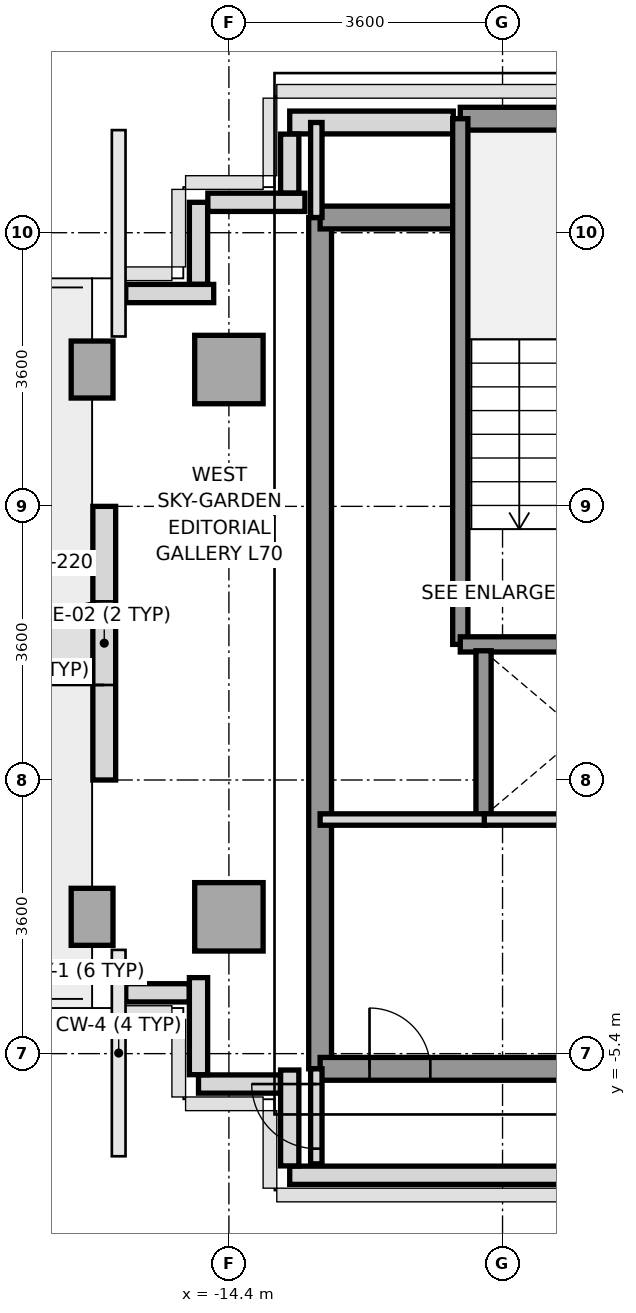
"""IFC4 building model, lengths in metres.
Left out: names, types, materials, properties, quantities, classifications, styles, units other than length and angle.
Written with IfcOpenShell. Run it as: python <this file> out.ifc"""

import sys

from ifc_helpers import new_model, si_unit, direction, frame, frame_2d, origin, origin_2d, place, context, subcontext, project, spatial, rectangle, extrude, source, transform, mapped, element, fill, save


model = new_model("IFC4")
c1 = context("Model", 3, precision=1e-05, world=origin(), true_north=direction((0.0, 1.0)))
c2 = subcontext(c1, "Body", "Model", "MODEL_VIEW")
j1 = project(units=[si_unit("LENGTHUNIT", "METRE"), si_unit("PLANEANGLEUNIT", "RADIAN")], contexts=[c1])
p1 = place(None, origin())
s1 = spatial("IfcSite", under=j1, at=p1, CompositionType="ELEMENT")
p2 = place(p1, origin())
s2 = spatial("IfcBuilding", under=s1, at=p2, CompositionType="ELEMENT")
p3 = place(p2, frame((0.0, 0.0, 252.4)))
s3 = spatial("IfcBuildingStorey", under=s2, at=p3, CompositionType="ELEMENT", Elevation=252.4)
m1 = source(origin(), c2, "Body", "SweptSolid", [
    extrude(rectangle(XDim=0.55, YDim=0.75, at=origin_2d()), origin(), (0.0, 0.0, 1.0), 3.01),
])
for number, where, z_axis, x_axis in (
    (1, (-16.2, -3.6, 0.0), (0.0, 0.0, 1.0), (1.0, 0.0, 0.0)),
    (2, (-16.2, 3.6, 0.0), (0.0, 0.0, 1.0), (1.0, 0.0, 0.0)),
):
    element("IfcColumn", number, at=place(p3, frame(where, z_axis=z_axis, x_axis=x_axis)), inside=s3, PredefinedType="COLUMN", context=c2, shape_type="MappedRepresentation", body=[
        mapped(m1, transform((0.0, 0.0, 0.0), x_axis=(1.0, 0.0, 0.0), y_axis=(0.0, 1.0, 0.0), z_axis=(0.0, 0.0, 1.0), scale=1.0)),
    ])
m2 = source(origin(), c2, "Body", "SweptSolid", [
    extrude(rectangle(XDim=0.9, YDim=0.9, at=origin_2d()), origin(), (0.0, 0.0, 1.0), 3.01),
])
for number, where, z_axis, x_axis in (
    (3, (-14.4, -3.6, 0.0), (0.0, 0.0, 1.0), (1.0, 0.0, 0.0)),
    (4, (-14.4, 3.6, 0.0), (0.0, 0.0, 1.0), (1.0, 0.0, 0.0)),
):
    element("IfcColumn", number, at=place(p3, frame(where, z_axis=z_axis, x_axis=x_axis)), inside=s3, PredefinedType="COLUMN", context=c2, shape_type="MappedRepresentation", body=[
        mapped(m2, transform((0.0, 0.0, 0.0), x_axis=(1.0, 0.0, 0.0), y_axis=(0.0, 1.0, 0.0), z_axis=(0.0, 0.0, 1.0), scale=1.0)),
    ])
p4 = place(p3, frame((-13.6, 6.85, 0.0), z_axis=(0.0, 0.0, 1.0), x_axis=(1.0, 0.0, 0.0)))
e5 = element("IfcWall", 5, at=p4, inside=s3, PredefinedType="SOLIDWALL", context=c2, shape_type="SweptSolid", body=[
    extrude(rectangle(XDim=2.152, YDim=0.3, at=frame_2d((1.076, 0.0))), origin(), (0.0, 0.0, 1.0), 3.01),
])
p5 = place(p3, frame((-16.04, -1.8, 0.0), z_axis=(0.0, 0.0, 1.0), x_axis=(0.0, 1.0, 0.0)))
e6 = element("IfcWall", 6, at=p5, inside=s3, PredefinedType="SOLIDWALL", context=c2, shape_type="SweptSolid", body=[
    extrude(rectangle(XDim=3.6, YDim=0.3, at=frame_2d((1.8, 0.0))), origin(), (0.0, 0.0, 1.0), 2.36),
])
p6 = place(p5, frame((1.25, 0.0, 0.0)))
e7 = element("IfcOpeningElement", 7, at=p6, cuts=e6, PredefinedType="OPENING", context=c2, shape_type="SweptSolid", body=[
    extrude(rectangle(XDim=1.1, YDim=2.3, at=frame_2d((0.55, 1.15))), frame((0.0, 0.16, 0.0), z_axis=(0.0, -1.0, 0.0), x_axis=(1.0, 0.0, 0.0)), (0.0, 0.0, 1.0), 0.32),
])
p7 = place(p3, frame((-9.523, -7.0, 0.0), z_axis=(0.0, 0.0, 1.0), x_axis=(-1.0, 0.0, 0.0)))
e8 = element("IfcWall", 8, at=p7, inside=s3, PredefinedType="PARAPET", context=c2, shape_type="SweptSolid", body=[
    extrude(rectangle(XDim=4.077, YDim=0.24, at=frame_2d((2.039, 0.0))), origin(), (0.0, 0.0, 1.0), 1.15),
])
p8 = place(p3, frame((-13.6, -6.877, 0.0), z_axis=(0.0, 0.0, 1.0), x_axis=(0.0, 1.0, 0.0)))
e9 = element("IfcWall", 9, at=p8, inside=s3, PredefinedType="PARAPET", context=c2, shape_type="SweptSolid", body=[
    extrude(rectangle(XDim=1.261, YDim=0.24, at=frame_2d((0.631, 0.0))), origin(), (0.0, 0.0, 1.0), 1.15),
])
p9 = place(p3, frame((-13.723, -5.8, 0.0), z_axis=(0.0, 0.0, 1.0), x_axis=(-1.0, 0.0, 0.0)))
e10 = element("IfcWall", 10, at=p9, inside=s3, PredefinedType="PARAPET", context=c2, shape_type="SweptSolid", body=[
    extrude(rectangle(XDim=1.077, YDim=0.24, at=frame_2d((0.539, 0.0))), origin(), (0.0, 0.0, 1.0), 1.15),
])
p10 = place(p3, frame((-14.8, -5.677, 0.0), z_axis=(0.0, 0.0, 1.0), x_axis=(0.0, 1.0, 0.0)))
e11 = element("IfcWall", 11, at=p10, inside=s3, PredefinedType="PARAPET", context=c2, shape_type="SweptSolid", body=[
    extrude(rectangle(XDim=1.277, YDim=0.24, at=frame_2d((0.639, 0.0))), origin(), (0.0, 0.0, 1.0), 1.15),
])
p11 = place(p3, frame((-14.923, -4.6, 0.0), z_axis=(0.0, 0.0, 1.0), x_axis=(-1.0, 0.0, 0.0)))
e12 = element("IfcWall", 12, at=p11, inside=s3, PredefinedType="PARAPET", context=c2, shape_type="SweptSolid", body=[
    extrude(rectangle(XDim=0.834, YDim=0.24, at=frame_2d((0.417, 0.0))), origin(), (0.0, 0.0, 1.0), 1.15),
])
p12 = place(p3, frame((-15.757, 4.6, 0.0), z_axis=(0.0, 0.0, 1.0), x_axis=(1.0, 0.0, 0.0)))
e13 = element("IfcWall", 13, at=p12, inside=s3, PredefinedType="PARAPET", context=c2, shape_type="SweptSolid", body=[
    extrude(rectangle(XDim=1.157, YDim=0.24, at=frame_2d((0.579, 0.0))), origin(), (0.0, 0.0, 1.0), 1.15),
])
p13 = place(p3, frame((-14.8, 4.723, 0.0), z_axis=(0.0, 0.0, 1.0), x_axis=(0.0, 1.0, 0.0)))
e14 = element("IfcWall", 14, at=p13, inside=s3, PredefinedType="PARAPET", context=c2, shape_type="SweptSolid", body=[
    extrude(rectangle(XDim=1.077, YDim=0.24, at=frame_2d((0.539, 0.0))), origin(), (0.0, 0.0, 1.0), 1.15),
])
p14 = place(p3, frame((-14.677, 5.8, 0.0), z_axis=(0.0, 0.0, 1.0), x_axis=(1.0, 0.0, 0.0)))
e15 = element("IfcWall", 15, at=p14, inside=s3, PredefinedType="PARAPET", context=c2, shape_type="SweptSolid", body=[
    extrude(rectangle(XDim=1.277, YDim=0.24, at=frame_2d((0.639, 0.0))), origin(), (0.0, 0.0, 1.0), 1.15),
])
p15 = place(p3, frame((-13.6, 5.923, 0.0), z_axis=(0.0, 0.0, 1.0), x_axis=(0.0, 1.0, 0.0)))
e16 = element("IfcWall", 16, at=p15, inside=s3, PredefinedType="PARAPET", context=c2, shape_type="SweptSolid", body=[
    extrude(rectangle(XDim=0.774, YDim=0.24, at=frame_2d((0.387, 0.0))), origin(), (0.0, 0.0, 1.0), 1.15),
])
p16 = place(p3, frame((-13.2, -5.6, 0.0), z_axis=(0.0, 0.0, 1.0), x_axis=(0.0, 1.0, 0.0)))
e17 = element("IfcWall", 17, at=p16, inside=s3, PredefinedType="SHEAR", context=c2, shape_type="SweptSolid", body=[
    extrude(rectangle(XDim=11.2, YDim=0.3, at=frame_2d((5.6, 0.0))), origin(), (0.0, 0.0, 1.0), 3.01),
])
p17 = place(p3, frame((-11.356, 6.9, 0.0), z_axis=(0.0, 0.0, 1.0), x_axis=(1.0, 0.0, 0.0)))
e18 = element("IfcWall", 18, at=p17, inside=s3, PredefinedType="SHEAR", context=c2, shape_type="SweptSolid", body=[
    extrude(rectangle(XDim=5.956, YDim=0.3, at=frame_2d((2.978, 0.0))), origin(), (0.0, 0.0, 1.0), 3.01),
])
p18 = place(p3, frame((-13.2, 5.6, 0.0), z_axis=(0.0, 0.0, 1.0), x_axis=(1.0, 0.0, 0.0)))
e19 = element("IfcWall", 19, at=p18, inside=s3, PredefinedType="SHEAR", context=c2, shape_type="SweptSolid", body=[
    extrude(rectangle(XDim=1.844, YDim=0.3, at=frame_2d((0.922, 0.0))), origin(), (0.0, 0.0, 1.0), 3.01),
])
p19 = place(p3, frame((-13.2, -5.6, 0.0), z_axis=(0.0, 0.0, 1.0), x_axis=(1.0, 0.0, 0.0)))
e20 = element("IfcWall", 20, at=p19, inside=s3, PredefinedType="SHEAR", context=c2, shape_type="SweptSolid", body=[
    extrude(rectangle(XDim=7.8, YDim=0.3, at=frame_2d((3.9, 0.0))), origin(), (0.0, 0.0, 1.0), 3.01),
])
p20 = place(p19, frame((0.65, 0.0, 0.0)))
e21 = element("IfcOpeningElement", 21, at=p20, cuts=e20, PredefinedType="OPENING", context=c2, shape_type="SweptSolid", body=[
    extrude(rectangle(XDim=0.8, YDim=2.1, at=frame_2d((0.4, 1.05))), frame((0.0, 0.16, 0.0), z_axis=(0.0, -1.0, 0.0), x_axis=(1.0, 0.0, 0.0)), (0.0, 0.0, 1.0), 0.32),
])
p21 = place(p19, frame((3.4, 0.0, 0.0)))
e22 = element("IfcOpeningElement", 22, at=p21, cuts=e20, PredefinedType="OPENING", context=c2, shape_type="SweptSolid", body=[
    extrude(rectangle(XDim=0.95, YDim=2.15, at=frame_2d((0.475, 1.075))), frame((0.0, 0.16, 0.0), z_axis=(0.0, -1.0, 0.0), x_axis=(1.0, 0.0, 0.0)), (0.0, 0.0, 1.0), 0.32),
])
p22 = place(p19, frame((5.8, 0.0, 0.0)))
e23 = element("IfcOpeningElement", 23, at=p22, cuts=e20, PredefinedType="OPENING", context=c2, shape_type="SweptSolid", body=[
    extrude(rectangle(XDim=0.95, YDim=2.15, at=frame_2d((0.475, 1.075))), frame((0.0, 0.16, 0.0), z_axis=(0.0, -1.0, 0.0), x_axis=(1.0, 0.0, 0.0)), (0.0, 0.0, 1.0), 0.32),
])
p23 = place(p3, frame((-11.356, -0.016, 0.0), z_axis=(0.0, 0.0, 1.0), x_axis=(0.0, 1.0, 0.0)))
e24 = element("IfcWall", 24, at=p23, inside=s3, PredefinedType="SOLIDWALL", context=c2, shape_type="SweptSolid", body=[
    extrude(rectangle(XDim=6.916, YDim=0.2, at=frame_2d((3.458, 0.0))), origin(), (0.0, 0.0, 1.0), 3.01),
])
p24 = place(p3, frame((-11.356, -0.016, 0.0), z_axis=(0.0, 0.0, 1.0), x_axis=(1.0, 0.0, 0.0)))
e25 = element("IfcWall", 25, at=p24, inside=s3, PredefinedType="SOLIDWALL", context=c2, shape_type="SweptSolid", body=[
    extrude(rectangle(XDim=3.152, YDim=0.2, at=frame_2d((1.576, 0.0))), origin(), (0.0, 0.0, 1.0), 3.01),
])
p25 = place(p3, frame((-11.05, -2.28, 0.0), z_axis=(0.0, 0.0, 1.0), x_axis=(0.0, 1.0, 0.0)))
e26 = element("IfcWall", 26, at=p25, inside=s3, PredefinedType="SOLIDWALL", context=c2, shape_type="SweptSolid", body=[
    extrude(rectangle(XDim=2.18, YDim=0.2, at=frame_2d((1.09, 0.0))), origin(), (0.0, 0.0, 1.0), 3.01),
])
p26 = place(p3, frame((-13.2, -2.32, 0.0), z_axis=(0.0, 0.0, 1.0), x_axis=(1.0, 0.0, 0.0)))
e27 = element("IfcWall", 27, at=p26, inside=s3, PredefinedType="PARTITIONING", context=c2, shape_type="SweptSolid", body=[
    extrude(rectangle(XDim=2.18, YDim=0.15, at=frame_2d((1.09, 0.0))), origin(), (0.0, 0.0, 1.0), 3.01),
])
p27 = place(p3, frame((-11.04, -2.32, 0.0), z_axis=(0.0, 0.0, 1.0), x_axis=(1.0, 0.0, 0.0)))
e28 = element("IfcWall", 28, at=p27, inside=s3, PredefinedType="PARTITIONING", context=c2, shape_type="SweptSolid", body=[
    extrude(rectangle(XDim=2.56, YDim=0.15, at=frame_2d((1.28, 0.0))), origin(), (0.0, 0.0, 1.0), 3.01),
])
p28 = place(p3, frame((-13.25, 5.6, 0.0), z_axis=(0.0, 0.0, 1.0), x_axis=(0.0, 1.0, 0.0)))
e29 = element("IfcWall", 29, at=p28, inside=s3, PredefinedType="PARTITIONING", context=c2, shape_type="SweptSolid", body=[
    extrude(rectangle(XDim=1.25, YDim=0.15, at=frame_2d((0.625, 0.0))), origin(), (0.0, 0.0, 1.0), 3.01),
])
p29 = place(p3, frame((-13.25, -6.85, 0.0), z_axis=(0.0, 0.0, 1.0), x_axis=(0.0, 1.0, 0.0)))
e30 = element("IfcWall", 30, at=p29, inside=s3, PredefinedType="PARTITIONING", context=c2, shape_type="SweptSolid", body=[
    extrude(rectangle(XDim=1.25, YDim=0.15, at=frame_2d((0.625, 0.0))), origin(), (0.0, 0.0, 1.0), 3.01),
])
p30 = place(p29, frame((0.2, 0.0, 0.0)))
e31 = element("IfcOpeningElement", 31, at=p30, cuts=e30, PredefinedType="OPENING", context=c2, shape_type="SweptSolid", body=[
    extrude(rectangle(XDim=0.85, YDim=2.1, at=frame_2d((0.425, 1.05))), frame((0.0, 0.085, 0.0), z_axis=(0.0, -1.0, 0.0), x_axis=(1.0, 0.0, 0.0)), (0.0, 0.0, 1.0), 0.17),
])
m3 = source(origin(), c2, "Body", "SweptSolid", [
    extrude(rectangle(XDim=1.1, YDim=2.3, at=frame_2d((0.55, 1.15))), frame((0.0, 0.025, 0.0), z_axis=(0.0, -1.0, 0.0), x_axis=(1.0, 0.0, 0.0)), (0.0, 0.0, 1.0), 0.05),
])
p31 = place(p6, origin())
e32 = element("IfcDoor", 32, at=p31, inside=s3, OperationType="SINGLE_SWING_LEFT", PredefinedType="DOOR", context=c2, shape_type="MappedRepresentation", body=[
    mapped(m3, transform((0.0, 0.0, 0.0), x_axis=(1.0, 0.0, 0.0), y_axis=(0.0, 1.0, 0.0), z_axis=(0.0, 0.0, 1.0), scale=1.0)),
])
fill(e7, e32)
m4 = source(origin(), c2, "Body", "SweptSolid", [
    extrude(rectangle(XDim=0.8, YDim=2.1, at=frame_2d((0.4, 1.05))), frame((0.0, 0.025, 0.0), z_axis=(0.0, -1.0, 0.0), x_axis=(1.0, 0.0, 0.0)), (0.0, 0.0, 1.0), 0.05),
])
p32 = place(p20, origin())
e33 = element("IfcDoor", 33, at=p32, inside=s3, OperationType="SINGLE_SWING_LEFT", PredefinedType="DOOR", context=c2, shape_type="MappedRepresentation", body=[
    mapped(m4, transform((0.0, 0.0, 0.0), x_axis=(1.0, 0.0, 0.0), y_axis=(0.0, 1.0, 0.0), z_axis=(0.0, 0.0, 1.0), scale=1.0)),
])
fill(e21, e33)
m5 = source(origin(), c2, "Body", "SweptSolid", [
    extrude(rectangle(XDim=0.85, YDim=2.1, at=frame_2d((0.425, 1.05))), frame((0.0, 0.025, 0.0), z_axis=(0.0, -1.0, 0.0), x_axis=(1.0, 0.0, 0.0)), (0.0, 0.0, 1.0), 0.05),
])
p33 = place(p30, origin())
e34 = element("IfcDoor", 34, at=p33, inside=s3, OperationType="SINGLE_SWING_RIGHT", PredefinedType="DOOR", context=c2, shape_type="MappedRepresentation", body=[
    mapped(m5, transform((0.0, 0.0, 0.0), x_axis=(1.0, 0.0, 0.0), y_axis=(0.0, 1.0, 0.0), z_axis=(0.0, 0.0, 1.0), scale=1.0)),
])
fill(e31, e34)
save(model, sys.argv[1])
